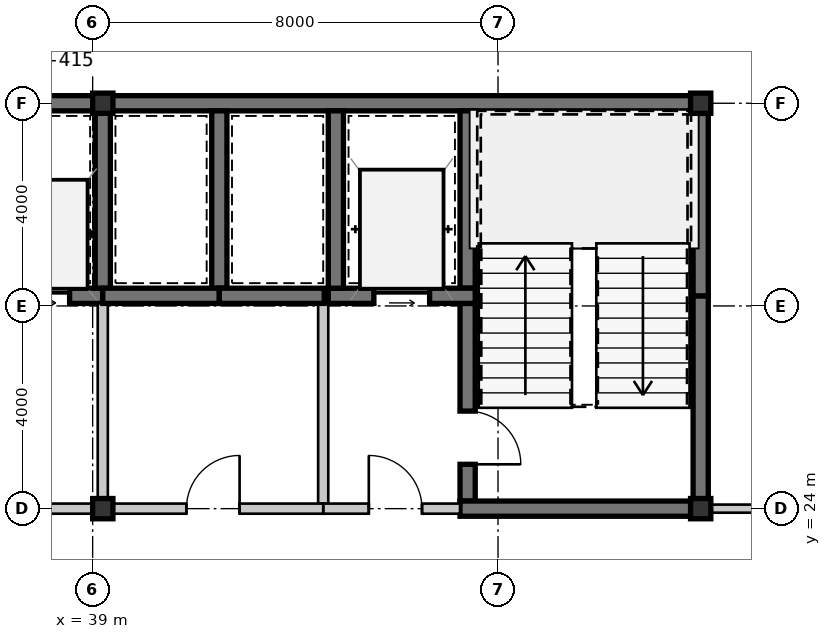
"""IFC4 building model, lengths in metres.
Left out: names, types, materials, properties, quantities, classifications, styles, units other than length and angle.
Written with IfcOpenShell. Run it as: python <this file> out.ifc"""

import sys

from ifc_helpers import new_model, si_unit, direction, frame, frame_2d, origin, origin_2d, place, context, subcontext, project, spatial, rectangle, hollow_rectangle, extrude, source, transform, mapped, element, fill, save


model = new_model("IFC4")
c1 = context("Model", 3, precision=1e-05, world=origin(), true_north=direction((0.0, 1.0)))
c2 = subcontext(c1, "Body", "Model", "MODEL_VIEW")
j1 = project(units=[si_unit("LENGTHUNIT", "METRE"), si_unit("PLANEANGLEUNIT", "RADIAN")], contexts=[c1])
p1 = place(None, origin())
s1 = spatial("IfcSite", under=j1, at=p1, CompositionType="ELEMENT")
p2 = place(p1, origin())
s2 = spatial("IfcBuilding", under=s1, at=p2, CompositionType="ELEMENT")
p3 = place(p2, frame((0.0, 0.0, 151.9)))
s3 = spatial("IfcBuildingStorey", under=s2, at=p3, CompositionType="ELEMENT", Elevation=151.9)
m1 = source(origin(), c2, "Body", "SweptSolid", [
    extrude(hollow_rectangle(XDim=0.4, YDim=0.4, WallThickness=0.016, at=origin_2d()), origin(), (0.0, 0.0, 1.0), 3.15),
])
for number, where, z_axis, x_axis in (
    (1, (39.2, 24.0, 0.0), (0.0, 0.0, 1.0), (1.0, 0.0, 0.0)),
    (2, (51.0, 24.0, 0.0), (0.0, 0.0, 1.0), (1.0, 0.0, 0.0)),
    (3, (39.2, 32.0, 0.0), (0.0, 0.0, 1.0), (1.0, 0.0, 0.0)),
    (4, (51.0, 32.0, 0.0), (0.0, 0.0, 1.0), (1.0, 0.0, 0.0)),
):
    element("IfcColumn", number, at=place(p3, frame(where, z_axis=z_axis, x_axis=x_axis)), inside=s3, PredefinedType="COLUMN", context=c2, shape_type="MappedRepresentation", body=[
        mapped(m1, transform((0.0, 0.0, 0.0), scale=1.0)),
    ])
m2 = source(origin(), c2, "Body", "SweptSolid", [
    extrude(rectangle(XDim=11.2, YDim=0.3, at=frame_2d((5.6, 0.0))), origin(), (0.0, 0.0, 1.0), 2.93),
])
p4 = place(p3, frame((28.0, 32.0, 0.0), z_axis=(0.0, 0.0, 1.0), x_axis=(1.0, 0.0, 0.0)))
e5 = element("IfcWall", 5, at=p4, inside=s3, PredefinedType="SHEAR", context=c2, shape_type="MappedRepresentation", body=[
    mapped(m2, transform((0.0, 0.0, 0.0), scale=1.0)),
])
m3 = source(origin(), c2, "Body", "SweptSolid", [
    extrude(rectangle(XDim=11.95, YDim=0.3, at=frame_2d((5.975, 0.0))), origin(), (0.0, 0.0, 1.0), 2.93),
])
p5 = place(p3, frame((39.2, 32.0, 0.0), z_axis=(0.0, 0.0, 1.0), x_axis=(1.0, 0.0, 0.0)))
e6 = element("IfcWall", 6, at=p5, inside=s3, PredefinedType="SHEAR", context=c2, shape_type="MappedRepresentation", body=[
    mapped(m3, transform((0.0, 0.0, 0.0), scale=1.0)),
])
m4 = source(origin(), c2, "Body", "SweptSolid", [
    extrude(rectangle(XDim=4.05, YDim=0.3, at=frame_2d((2.025, 0.0))), origin(), (0.0, 0.0, 1.0), 2.93),
])
p6 = place(p3, frame((51.0, 24.15, 0.0), z_axis=(0.0, 0.0, 1.0), x_axis=(0.0, 1.0, 0.0)))
e7 = element("IfcWall", 7, at=p6, inside=s3, PredefinedType="SHEAR", context=c2, shape_type="MappedRepresentation", body=[
    mapped(m4, transform((0.0, 0.0, 0.0), scale=1.0)),
])
m5 = source(origin(), c2, "Body", "SweptSolid", [
    extrude(rectangle(XDim=3.65, YDim=0.3, at=frame_2d((1.825, 0.0))), origin(), (0.0, 0.0, 1.0), 2.93),
])
p7 = place(p3, frame((51.0, 28.2, 0.0), z_axis=(0.0, 0.0, 1.0), x_axis=(0.0, 1.0, 0.0)))
e8 = element("IfcWall", 8, at=p7, inside=s3, PredefinedType="SHEAR", context=c2, shape_type="MappedRepresentation", body=[
    mapped(m5, transform((0.0, 0.0, 0.0), scale=1.0)),
])
m6 = source(origin(), c2, "Body", "SweptSolid", [
    extrude(rectangle(XDim=3.5, YDim=0.3, at=frame_2d((1.75, 0.0))), origin(), (0.0, 0.0, 1.0), 2.93),
])
p8 = place(p3, frame((46.4, 31.85, 0.0), z_axis=(0.0, 0.0, 1.0), x_axis=(0.0, -1.0, 0.0)))
e9 = element("IfcWall", 9, at=p8, inside=s3, PredefinedType="SHEAR", context=c2, shape_type="MappedRepresentation", body=[
    mapped(m6, transform((0.0, 0.0, 0.0), scale=1.0)),
])
m7 = source(origin(), c2, "Body", "SweptSolid", [
    extrude(rectangle(XDim=3.9, YDim=0.3, at=frame_2d((1.95, 0.0))), origin(), (0.0, 0.0, 1.0), 2.93),
])
p9 = place(p3, frame((46.4, 28.05, 0.0), z_axis=(0.0, 0.0, 1.0), x_axis=(0.0, -1.0, 0.0)))
e10 = element("IfcWall", 10, at=p9, inside=s3, PredefinedType="SHEAR", context=c2, shape_type="MappedRepresentation", body=[
    mapped(m7, transform((0.0, 0.0, 0.0), scale=1.0)),
])
m8 = source(origin(), c2, "Body", "SweptSolid", [
    extrude(rectangle(XDim=1.05, YDim=2.1, at=frame_2d((0.525, 1.05))), frame((0.0, 0.16, 0.0), z_axis=(0.0, -1.0, 0.0), x_axis=(1.0, 0.0, 0.0)), (0.0, 0.0, 1.0), 0.32),
])
p10 = place(p9, frame((2.125, 0.0, 0.0)))
e11 = element("IfcOpeningElement", 11, at=p10, cuts=e10, PredefinedType="OPENING", context=c2, shape_type="MappedRepresentation", body=[
    mapped(m8, transform((0.0, 0.0, 0.0), scale=1.0)),
])
m9 = source(origin(), c2, "Body", "SweptSolid", [
    extrude(rectangle(XDim=4.9, YDim=0.3, at=frame_2d((2.45, 0.0))), origin(), (0.0, 0.0, 1.0), 2.93),
])
p11 = place(p3, frame((46.25, 24.0, 0.0), z_axis=(0.0, 0.0, 1.0), x_axis=(1.0, 0.0, 0.0)))
e12 = element("IfcWall", 12, at=p11, inside=s3, PredefinedType="SHEAR", context=c2, shape_type="MappedRepresentation", body=[
    mapped(m9, transform((0.0, 0.0, 0.0), scale=1.0)),
])
m10 = source(origin(), c2, "Body", "SweptSolid", [
    extrude(rectangle(XDim=2.9, YDim=0.3, at=frame_2d((1.45, 0.0))), origin(), (0.0, 0.0, 1.0), 2.93),
])
p12 = place(p3, frame((43.65, 28.2, 0.0), z_axis=(0.0, 0.0, 1.0), x_axis=(1.0, 0.0, 0.0)))
e13 = element("IfcWall", 13, at=p12, inside=s3, PredefinedType="SHEAR", context=c2, shape_type="MappedRepresentation", body=[
    mapped(m10, transform((0.0, 0.0, 0.0), scale=1.0)),
])
m11 = source(origin(), c2, "Body", "SweptSolid", [
    extrude(rectangle(XDim=1.1, YDim=2.15, at=frame_2d((0.55, 1.075))), frame((0.0, 0.16, 0.0), z_axis=(0.0, -1.0, 0.0), x_axis=(1.0, 0.0, 0.0)), (0.0, 0.0, 1.0), 0.32),
])
p13 = place(p12, frame((0.9, 0.0, 0.0)))
e14 = element("IfcOpeningElement", 14, at=p13, cuts=e13, PredefinedType="OPENING", context=c2, shape_type="MappedRepresentation", body=[
    mapped(m11, transform((0.0, 0.0, 0.0), scale=1.0)),
])
p14 = place(p3, frame((43.8, 31.85, 0.0), z_axis=(0.0, 0.0, 1.0), x_axis=(0.0, -1.0, 0.0)))
e15 = element("IfcWall", 15, at=p14, inside=s3, PredefinedType="SHEAR", context=c2, shape_type="MappedRepresentation", body=[
    mapped(m6, transform((0.0, 0.0, 0.0), scale=1.0)),
])
m12 = source(origin(), c2, "Body", "SweptSolid", [
    extrude(rectangle(XDim=3.95, YDim=0.2, at=frame_2d((1.975, 0.0))), origin(), (0.0, 0.0, 1.0), 2.93),
])
p15 = place(p3, frame((43.55, 28.05, 0.0), z_axis=(0.0, 0.0, 1.0), x_axis=(0.0, -1.0, 0.0)))
e16 = element("IfcWall", 16, at=p15, inside=s3, PredefinedType="SOLIDWALL", context=c2, shape_type="MappedRepresentation", body=[
    mapped(m12, transform((0.0, 0.0, 0.0), scale=1.0)),
])
m13 = source(origin(), c2, "Body", "SweptSolid", [
    extrude(rectangle(XDim=2.7, YDim=0.2, at=frame_2d((1.35, 0.0))), origin(), (0.0, 0.0, 1.0), 2.397),
])
p16 = place(p3, frame((43.55, 24.0, 0.0), z_axis=(0.0, 0.0, 1.0), x_axis=(1.0, 0.0, 0.0)))
e17 = element("IfcWall", 17, at=p16, inside=s3, PredefinedType="SOLIDWALL", context=c2, shape_type="MappedRepresentation", body=[
    mapped(m13, transform((0.0, 0.0, 0.0), scale=1.0)),
])
m14 = source(origin(), c2, "Body", "SweptSolid", [
    extrude(rectangle(XDim=1.05, YDim=2.1, at=frame_2d((0.525, 1.05))), frame((0.0, 0.11, 0.0), z_axis=(0.0, -1.0, 0.0), x_axis=(1.0, 0.0, 0.0)), (0.0, 0.0, 1.0), 0.22),
])
p17 = place(p16, frame((0.9, 0.0, 0.0)))
e18 = element("IfcOpeningElement", 18, at=p17, cuts=e17, PredefinedType="OPENING", context=c2, shape_type="MappedRepresentation", body=[
    mapped(m14, transform((0.0, 0.0, 0.0), scale=1.0)),
])
m15 = source(origin(), c2, "Body", "SweptSolid", [
    extrude(rectangle(XDim=2.5, YDim=0.3, at=frame_2d((1.25, 0.0))), origin(), (0.0, 0.0, 1.0), 2.93),
])
p18 = place(p3, frame((36.7, 28.2, 0.0), z_axis=(0.0, 0.0, 1.0), x_axis=(1.0, 0.0, 0.0)))
e19 = element("IfcWall", 19, at=p18, inside=s3, PredefinedType="SHEAR", context=c2, shape_type="MappedRepresentation", body=[
    mapped(m15, transform((0.0, 0.0, 0.0), scale=1.0)),
])
m16 = source(origin(), c2, "Body", "SweptSolid", [
    extrude(rectangle(XDim=1.05, YDim=2.15, at=frame_2d((0.525, 1.075))), frame((0.0, 0.16, 0.0), z_axis=(0.0, -1.0, 0.0), x_axis=(1.0, 0.0, 0.0)), (0.0, 0.0, 1.0), 0.32),
])
p19 = place(p18, frame((0.795, 0.0, 0.0)))
e20 = element("IfcOpeningElement", 20, at=p19, cuts=e19, PredefinedType="OPENING", context=c2, shape_type="MappedRepresentation", body=[
    mapped(m16, transform((0.0, 0.0, 0.0), scale=1.0)),
])
p20 = place(p3, frame((39.2, 28.35, 0.0), z_axis=(0.0, 0.0, 1.0), x_axis=(0.0, 1.0, 0.0)))
e21 = element("IfcWall", 21, at=p20, inside=s3, PredefinedType="SHEAR", context=c2, shape_type="MappedRepresentation", body=[
    mapped(m6, transform((0.0, 0.0, 0.0), scale=1.0)),
])
m17 = source(origin(), c2, "Body", "SweptSolid", [
    extrude(rectangle(XDim=3.95, YDim=0.2, at=frame_2d((1.975, 0.0))), origin(), (0.0, 0.0, 1.0), 2.47),
])
p21 = place(p3, frame((39.2, 28.05, 0.0), z_axis=(0.0, 0.0, 1.0), x_axis=(0.0, -1.0, 0.0)))
e22 = element("IfcWall", 22, at=p21, inside=s3, PredefinedType="SOLIDWALL", context=c2, shape_type="MappedRepresentation", body=[
    mapped(m17, transform((0.0, 0.0, 0.0), scale=1.0)),
])
m18 = source(origin(), c2, "Body", "SweptSolid", [
    extrude(rectangle(XDim=6.35, YDim=0.2, at=frame_2d((3.175, 0.0))), origin(), (0.0, 0.0, 1.0), 2.47),
])
p22 = place(p3, frame((39.2, 24.0, 0.0), z_axis=(0.0, 0.0, 1.0), x_axis=(-1.0, 0.0, 0.0)))
e23 = element("IfcWall", 23, at=p22, inside=s3, PredefinedType="SOLIDWALL", context=c2, shape_type="MappedRepresentation", body=[
    mapped(m18, transform((0.0, 0.0, 0.0), scale=1.0)),
])
p23 = place(p22, frame((2.65, 0.0, 0.0)))
e24 = element("IfcOpeningElement", 24, at=p23, cuts=e23, PredefinedType="OPENING", context=c2, shape_type="MappedRepresentation", body=[
    mapped(m14, transform((0.0, 0.0, 0.0), scale=1.0)),
])
p24 = place(p3, frame((41.5, 28.35, 0.0), z_axis=(0.0, 0.0, 1.0), x_axis=(0.0, 1.0, 0.0)))
e25 = element("IfcWall", 25, at=p24, inside=s3, PredefinedType="SHEAR", context=c2, shape_type="MappedRepresentation", body=[
    mapped(m6, transform((0.0, 0.0, 0.0), scale=1.0)),
])
m19 = source(origin(), c2, "Body", "SweptSolid", [
    extrude(rectangle(XDim=2.3, YDim=0.3, at=frame_2d((1.15, 0.0))), origin(), (0.0, 0.0, 1.0), 2.93),
])
p25 = place(p3, frame((39.2, 28.2, 0.0), z_axis=(0.0, 0.0, 1.0), x_axis=(1.0, 0.0, 0.0)))
e26 = element("IfcWall", 26, at=p25, inside=s3, PredefinedType="SHEAR", context=c2, shape_type="MappedRepresentation", body=[
    mapped(m19, transform((0.0, 0.0, 0.0), scale=1.0)),
])
m20 = source(origin(), c2, "Body", "SweptSolid", [
    extrude(rectangle(XDim=2.07, YDim=0.3, at=frame_2d((1.035, 0.0))), origin(), (0.0, 0.0, 1.0), 2.93),
])
p26 = place(p3, frame((41.5, 28.2, 0.0), z_axis=(0.0, 0.0, 1.0), x_axis=(1.0, 0.0, 0.0)))
e27 = element("IfcWall", 27, at=p26, inside=s3, PredefinedType="SHEAR", context=c2, shape_type="MappedRepresentation", body=[
    mapped(m20, transform((0.0, 0.0, 0.0), scale=1.0)),
])
m21 = source(origin(), c2, "Body", "SweptSolid", [
    extrude(rectangle(XDim=4.35, YDim=0.2, at=frame_2d((2.175, 0.0))), origin(), (0.0, 0.0, 1.0), 2.397),
])
p27 = place(p3, frame((43.55, 24.0, 0.0), z_axis=(0.0, 0.0, 1.0), x_axis=(-1.0, 0.0, 0.0)))
e28 = element("IfcWall", 28, at=p27, inside=s3, PredefinedType="SOLIDWALL", context=c2, shape_type="MappedRepresentation", body=[
    mapped(m21, transform((0.0, 0.0, 0.0), scale=1.0)),
])
p28 = place(p27, frame((1.65, 0.0, 0.0)))
e29 = element("IfcOpeningElement", 29, at=p28, cuts=e28, PredefinedType="OPENING", context=c2, shape_type="MappedRepresentation", body=[
    mapped(m14, transform((0.0, 0.0, 0.0), scale=1.0)),
])
m22 = source(origin(), c2, "Body", "SweptSolid", [
    extrude(rectangle(XDim=10.1, YDim=0.16, at=frame_2d((5.05, 0.0))), origin(), (0.0, 0.0, 1.0), 2.93),
])
p29 = place(p3, frame((51.15, 24.0, 0.0), z_axis=(0.0, 0.0, 1.0), x_axis=(1.0, 0.0, 0.0)))
e30 = element("IfcWall", 30, at=p29, inside=s3, PredefinedType="PARTITIONING", context=c2, shape_type="MappedRepresentation", body=[
    mapped(m22, transform((0.0, 0.0, 0.0), scale=1.0)),
])
m23 = source(origin(), c2, "Body", "SweptSolid", [
    extrude(rectangle(XDim=0.92, YDim=2.1, at=frame_2d((0.46, 1.05))), frame((0.0, 0.09, 0.0), z_axis=(0.0, -1.0, 0.0), x_axis=(1.0, 0.0, 0.0)), (0.0, 0.0, 1.0), 0.18),
])
p30 = place(p29, frame((4.525, 0.0, 0.0)))
e31 = element("IfcOpeningElement", 31, at=p30, cuts=e30, PredefinedType="OPENING", context=c2, shape_type="MappedRepresentation", body=[
    mapped(m23, transform((0.0, 0.0, 0.0), scale=1.0)),
])
m24 = source(origin(), c2, "Body", "SweptSolid", [
    extrude(rectangle(XDim=1.05, YDim=2.1, at=frame_2d((0.525, 1.05))), frame((0.0, 0.025, 0.0), z_axis=(0.0, -1.0, 0.0), x_axis=(1.0, 0.0, 0.0)), (0.0, 0.0, 1.0), 0.05),
])
p31 = place(p10, origin())
e32 = element("IfcDoor", 32, at=p31, inside=s3, OperationType="SINGLE_SWING_RIGHT", PredefinedType="DOOR", context=c2, shape_type="MappedRepresentation", body=[
    mapped(m24, transform((0.0, 0.0, 0.0), scale=1.0)),
])
fill(e11, e32)
m25 = source(origin(), c2, "Body", "SweptSolid", [
    extrude(rectangle(XDim=1.1, YDim=2.15, at=frame_2d((0.55, 1.075))), frame((0.0, 0.025, 0.0), z_axis=(0.0, -1.0, 0.0), x_axis=(1.0, 0.0, 0.0)), (0.0, 0.0, 1.0), 0.05),
])
p32 = place(p13, origin())
e33 = element("IfcDoor", 33, at=p32, inside=s3, OperationType="SLIDING_TO_LEFT", PredefinedType="DOOR", context=c2, shape_type="MappedRepresentation", body=[
    mapped(m25, transform((0.0, 0.0, 0.0), scale=1.0)),
])
fill(e14, e33)
p33 = place(p17, origin())
e34 = element("IfcDoor", 34, at=p33, inside=s3, OperationType="SINGLE_SWING_LEFT", PredefinedType="DOOR", context=c2, shape_type="MappedRepresentation", body=[
    mapped(m24, transform((0.0, 0.0, 0.0), scale=1.0)),
])
fill(e18, e34)
m26 = source(origin(), c2, "Body", "SweptSolid", [
    extrude(rectangle(XDim=1.05, YDim=2.15, at=frame_2d((0.525, 1.075))), frame((0.0, 0.025, 0.0), z_axis=(0.0, -1.0, 0.0), x_axis=(1.0, 0.0, 0.0)), (0.0, 0.0, 1.0), 0.05),
])
p34 = place(p19, origin())
e35 = element("IfcDoor", 35, at=p34, inside=s3, OperationType="SLIDING_TO_LEFT", PredefinedType="DOOR", context=c2, shape_type="MappedRepresentation", body=[
    mapped(m26, transform((0.0, 0.0, 0.0), scale=1.0)),
])
fill(e20, e35)
p35 = place(p28, frame((1.05, 0.0, 0.0), z_axis=(0.0, 0.0, 1.0), x_axis=(-1.0, 0.0, 0.0)))
e36 = element("IfcDoor", 36, at=p35, inside=s3, OperationType="SINGLE_SWING_RIGHT", PredefinedType="DOOR", context=c2, shape_type="MappedRepresentation", body=[
    mapped(m24, transform((0.0, 0.0, 0.0), scale=1.0)),
])
fill(e29, e36)
save(model, sys.argv[1])
